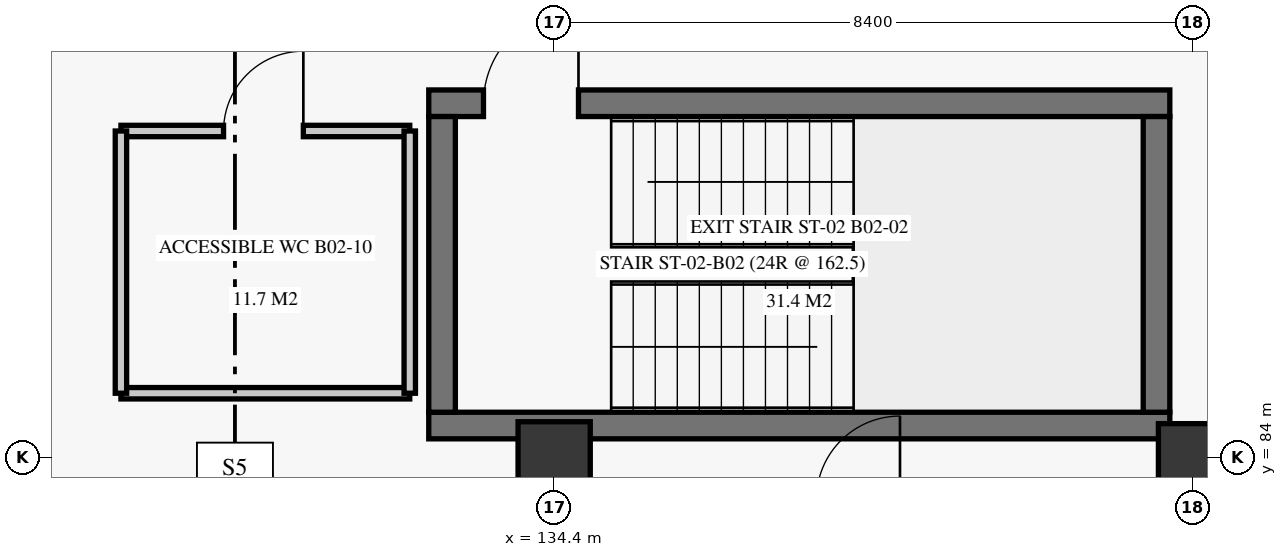
"""IFC4 building model, lengths in metres.
Left out: names, types, materials, properties, quantities, classifications, styles, units other than length and angle.
Written with IfcOpenShell. Run it as: python <this file> out.ifc"""

import sys

from ifc_helpers import new_model, si_unit, direction, frame, frame_2d, origin, origin_2d, place, context, subcontext, project, spatial, rectangle, extrude, element, fill, save


model = new_model("IFC4")
c1 = context("Model", 3, precision=1e-05, world=origin(), true_north=direction((0.0, 1.0)))
c2 = subcontext(c1, "Body", "Model", "MODEL_VIEW")
j1 = project(units=[si_unit("LENGTHUNIT", "METRE"), si_unit("PLANEANGLEUNIT", "RADIAN")], contexts=[c1])
p1 = place(None, origin())
s1 = spatial("IfcSite", under=j1, at=p1, CompositionType="ELEMENT")
p2 = place(p1, origin())
s2 = spatial("IfcBuilding", under=s1, at=p2, CompositionType="ELEMENT")
p3 = place(p2, frame((0.0, 0.0, -8.1)))
s3 = spatial("IfcBuildingStorey", under=s2, at=p3, CompositionType="ELEMENT", Elevation=-8.1)
p4 = place(p3, frame((134.4, 84.0, 0.0), z_axis=(0.0, 0.0, 1.0), x_axis=(1.0, 0.0, 0.0)))
e1 = element("IfcColumn", 1, at=p4, inside=s3, PredefinedType="COLUMN", context=c2, shape_type="SweptSolid", body=[
    extrude(rectangle(XDim=0.95, YDim=0.95, at=origin_2d()), origin(), (0.0, 0.0, 1.0), 3.6),
])
p5 = place(p3, frame((142.8, 84.0, 0.0), z_axis=(0.0, 0.0, 1.0), x_axis=(1.0, 0.0, 0.0)))
e2 = element("IfcColumn", 2, at=p5, inside=s3, PredefinedType="COLUMN", context=c2, shape_type="SweptSolid", body=[
    extrude(rectangle(XDim=0.9, YDim=0.9, at=origin_2d()), origin(), (0.0, 0.0, 1.0), 3.6),
])
p6 = place(p3, frame((132.75, 84.425, 0.0), z_axis=(0.0, 0.0, 1.0), x_axis=(1.0, 0.0, 0.0)))
e3 = element("IfcWall", 3, at=p6, inside=s3, PredefinedType="SHEAR", context=c2, shape_type="SweptSolid", body=[
    extrude(rectangle(XDim=9.75, YDim=0.35, at=frame_2d((4.875, 0.0))), origin(), (0.0, 0.0, 1.0), 3.6),
])
p7 = place(p3, frame((132.75, 88.665, 0.0), z_axis=(0.0, 0.0, 1.0), x_axis=(1.0, 0.0, 0.0)))
e4 = element("IfcWall", 4, at=p7, inside=s3, PredefinedType="SHEAR", context=c2, shape_type="SweptSolid", body=[
    extrude(rectangle(XDim=9.75, YDim=0.35, at=frame_2d((4.875, 0.0))), origin(), (0.0, 0.0, 1.0), 3.6),
])
p8 = place(p7, frame((0.72, 0.0, 0.0)))
e5 = element("IfcOpeningElement", 5, at=p8, cuts=e4, PredefinedType="OPENING", context=c2, shape_type="SweptSolid", body=[
    extrude(rectangle(XDim=1.25, YDim=2.2, at=frame_2d((0.625, 1.1))), frame((0.0, 0.185, 0.0), z_axis=(0.0, -1.0, 0.0), x_axis=(1.0, 0.0, 0.0)), (0.0, 0.0, 1.0), 0.37),
])
for number, where, z_axis, x_axis in (
    (6, (132.925, 84.6, 0.0), (0.0, 0.0, 1.0), (0.0, 1.0, 0.0)),
    (7, (142.325, 84.6, 0.0), (0.0, 0.0, 1.0), (0.0, 1.0, 0.0)),
):
    element("IfcWall", number, at=place(p3, frame(where, z_axis=z_axis, x_axis=x_axis)), inside=s3, PredefinedType="SHEAR", context=c2, shape_type="SweptSolid", body=[
        extrude(rectangle(XDim=3.89, YDim=0.35, at=frame_2d((1.945, 0.0))), origin(), (0.0, 0.0, 1.0), 3.6),
    ])
p9 = place(p3, frame((128.7, 88.3, 0.0), z_axis=(0.0, 0.0, 1.0), x_axis=(1.0, 0.0, 0.0)))
e8 = element("IfcWall", 8, at=p9, inside=s3, PredefinedType="PARTITIONING", context=c2, shape_type="SweptSolid", body=[
    extrude(rectangle(XDim=3.8, YDim=0.15, at=frame_2d((1.9, 0.0))), origin(), (0.0, 0.0, 1.0), 3.22),
])
p10 = place(p9, frame((1.35, 0.0, 0.0)))
e9 = element("IfcOpeningElement", 9, at=p10, cuts=e8, PredefinedType="OPENING", context=c2, shape_type="SweptSolid", body=[
    extrude(rectangle(XDim=1.05, YDim=2.15, at=frame_2d((0.525, 1.075))), frame((0.0, 0.085, 0.0), z_axis=(0.0, -1.0, 0.0), x_axis=(1.0, 0.0, 0.0)), (0.0, 0.0, 1.0), 0.17),
])
p11 = place(p3, frame((128.7, 84.85, 0.0), z_axis=(0.0, 0.0, 1.0), x_axis=(1.0, 0.0, 0.0)))
e10 = element("IfcWall", 10, at=p11, inside=s3, PredefinedType="PARTITIONING", context=c2, shape_type="SweptSolid", body=[
    extrude(rectangle(XDim=3.8, YDim=0.15, at=frame_2d((1.9, 0.0))), origin(), (0.0, 0.0, 1.0), 3.22),
])
for number, where, z_axis, x_axis in (
    (11, (128.7, 84.85, 0.0), (0.0, 0.0, 1.0), (0.0, 1.0, 0.0)),
    (12, (132.5, 84.85, 0.0), (0.0, 0.0, 1.0), (0.0, 1.0, 0.0)),
):
    element("IfcWall", number, at=place(p3, frame(where, z_axis=z_axis, x_axis=x_axis)), inside=s3, PredefinedType="PARTITIONING", context=c2, shape_type="SweptSolid", body=[
        extrude(rectangle(XDim=3.45, YDim=0.15, at=frame_2d((1.725, 0.0))), origin(), (0.0, 0.0, 1.0), 3.22),
    ])
p12 = place(p8, origin())
e13 = element("IfcDoor", 13, at=p12, inside=s3, OperationType="SINGLE_SWING_RIGHT", PredefinedType="DOOR", context=c2, shape_type="SweptSolid", body=[
    extrude(rectangle(XDim=1.25, YDim=2.2, at=frame_2d((0.625, 1.1))), frame((0.0, 0.025, 0.0), z_axis=(0.0, -1.0, 0.0), x_axis=(1.0, 0.0, 0.0)), (0.0, 0.0, 1.0), 0.05),
])
fill(e5, e13)
p13 = place(p10, origin())
e14 = element("IfcDoor", 14, at=p13, inside=s3, OperationType="SINGLE_SWING_RIGHT", PredefinedType="DOOR", context=c2, shape_type="SweptSolid", body=[
    extrude(rectangle(XDim=1.05, YDim=2.15, at=frame_2d((0.525, 1.075))), frame((0.0, 0.025, 0.0), z_axis=(0.0, -1.0, 0.0), x_axis=(1.0, 0.0, 0.0)), (0.0, 0.0, 1.0), 0.05),
])
fill(e9, e14)
save(model, sys.argv[1])
